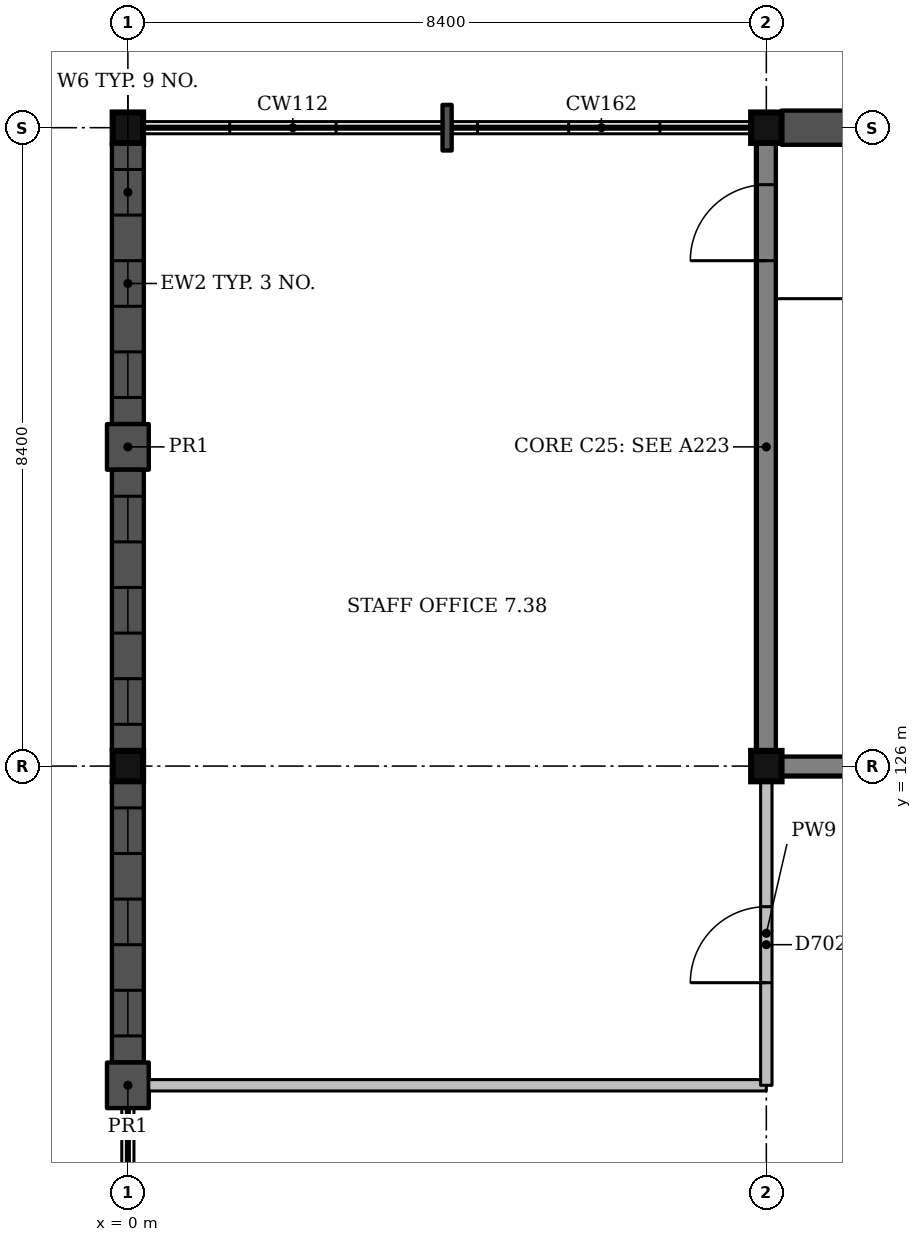
"""IFC4 building model, lengths in metres.
Left out: names, types, materials, properties, quantities, classifications, styles, units other than length and angle.
Written with IfcOpenShell. Run it as: python <this file> out.ifc"""

import sys

from ifc_helpers import new_model, si_unit, direction, frame, frame_2d, origin, origin_2d, place, context, subcontext, project, spatial, rectangle, extrude, element, fill, save


model = new_model("IFC4")
c1 = context("Model", 3, precision=1e-05, world=origin(), true_north=direction((0.0, 1.0)))
c2 = subcontext(c1, "Body", "Model", "MODEL_VIEW")
j1 = project(units=[si_unit("LENGTHUNIT", "METRE"), si_unit("PLANEANGLEUNIT", "RADIAN")], contexts=[c1])
p1 = place(None, origin())
s1 = spatial("IfcSite", under=j1, at=p1, CompositionType="ELEMENT")
p2 = place(p1, origin())
s2 = spatial("IfcBuilding", under=s1, at=p2, CompositionType="ELEMENT")
p3 = place(p2, frame((0.0, 0.0, 31.5)))
s3 = spatial("IfcBuildingStorey", under=s2, at=p3, CompositionType="ELEMENT", Elevation=31.5)
for number, where, z_axis, x_axis in (
    (1, (0.0, 126.0, 0.0), (0.0, 0.0, 1.0), (1.0, 0.0, 0.0)),
    (2, (0.0, 134.4, 0.0), (0.0, 0.0, 1.0), (1.0, 0.0, 0.0)),
    (3, (8.4, 126.0, 0.0), (0.0, 0.0, 1.0), (1.0, 0.0, 0.0)),
    (4, (8.4, 134.4, 0.0), (0.0, 0.0, 1.0), (1.0, 0.0, 0.0)),
):
    element("IfcColumn", number, at=place(p3, frame(where, z_axis=z_axis, x_axis=x_axis)), inside=s3, PredefinedType="COLUMN", context=c2, shape_type="SweptSolid", body=[
        extrude(rectangle(XDim=0.4, YDim=0.4, at=origin_2d()), origin(), (0.0, 0.0, 1.0), 4.5),
    ])
p4 = place(p3, frame((8.6, 126.0, 0.0), z_axis=(0.0, 0.0, 1.0), x_axis=(1.0, 0.0, 0.0)))
e5 = element("IfcWall", 5, at=p4, inside=s3, PredefinedType="SHEAR", context=c2, shape_type="SweptSolid", body=[
    extrude(rectangle(XDim=5.525, YDim=0.25, at=frame_2d((2.762, 0.0))), origin(), (0.0, 0.0, 1.0), 4.2),
])
p5 = place(p3, frame((8.4, 126.2, 0.0), z_axis=(0.0, 0.0, 1.0), x_axis=(0.0, 1.0, 0.0)))
e6 = element("IfcWall", 6, at=p5, inside=s3, PredefinedType="SHEAR", context=c2, shape_type="SweptSolid", body=[
    extrude(rectangle(XDim=8.0, YDim=0.25, at=frame_2d((4.0, 0.0))), origin(), (0.0, 0.0, 1.0), 4.2),
])
p6 = place(p5, frame((6.45, 0.0, 0.0)))
e7 = element("IfcOpeningElement", 7, at=p6, cuts=e6, PredefinedType="OPENING", context=c2, shape_type="SweptSolid", body=[
    extrude(rectangle(XDim=1.0, YDim=2.1, at=frame_2d((0.5, 1.05))), frame((0.0, 0.135, 0.0), z_axis=(0.0, -1.0, 0.0), x_axis=(1.0, 0.0, 0.0)), (0.0, 0.0, 1.0), 0.27),
])
p7 = place(p3, frame((11.207, 134.4, 0.0), z_axis=(0.0, 0.0, 1.0), x_axis=(-1.0, 0.0, 0.0)))
e8 = element("IfcWall", 8, at=p7, inside=s3, PredefinedType="SOLIDWALL", context=c2, shape_type="SweptSolid", body=[
    extrude(rectangle(XDim=2.607, YDim=0.45, at=frame_2d((1.303, 0.0))), origin(), (0.0, 0.0, 1.0), 3.6),
])
p8 = place(p3, frame((4.26, 134.4, 0.0), z_axis=(0.0, 0.0, 1.0), x_axis=(-1.0, 0.0, 0.0)))
e9 = element("IfcWall", 9, at=p8, inside=s3, PredefinedType="SOLIDWALL", context=c2, shape_type="SweptSolid", body=[
    extrude(rectangle(XDim=0.12, YDim=0.6, at=frame_2d((0.06, 0.0))), origin(), (0.0, 0.0, 1.0), 3.6),
])
p9 = place(p3, frame((0.0, 134.2, 0.0), z_axis=(0.0, 0.0, 1.0), x_axis=(0.0, -1.0, 0.0)))
e10 = element("IfcWall", 10, at=p9, inside=s3, PredefinedType="SOLIDWALL", context=c2, shape_type="SweptSolid", body=[
    extrude(rectangle(XDim=3.7, YDim=0.42, at=frame_2d((1.85, 0.0))), origin(), (0.0, 0.0, 1.0), 3.6),
])
p10 = place(p9, frame((0.35, 0.0, 1.0)))
e11 = element("IfcOpeningElement", 11, at=p10, cuts=e10, PredefinedType="OPENING", context=c2, shape_type="SweptSolid", body=[
    extrude(rectangle(XDim=0.6, YDim=2.1, at=frame_2d((0.3, 1.05))), frame((0.0, 0.22, 0.0), z_axis=(0.0, -1.0, 0.0), x_axis=(1.0, 0.0, 0.0)), (0.0, 0.0, 1.0), 0.44),
])
p11 = place(p9, frame((1.55, 0.0, 1.0)))
e12 = element("IfcOpeningElement", 12, at=p11, cuts=e10, PredefinedType="OPENING", context=c2, shape_type="SweptSolid", body=[
    extrude(rectangle(XDim=0.6, YDim=2.1, at=frame_2d((0.3, 1.05))), frame((0.0, 0.22, 0.0), z_axis=(0.0, -1.0, 0.0), x_axis=(1.0, 0.0, 0.0)), (0.0, 0.0, 1.0), 0.44),
])
p12 = place(p9, frame((2.75, 0.0, 1.0)))
e13 = element("IfcOpeningElement", 13, at=p12, cuts=e10, PredefinedType="OPENING", context=c2, shape_type="SweptSolid", body=[
    extrude(rectangle(XDim=0.6, YDim=2.1, at=frame_2d((0.3, 1.05))), frame((0.0, 0.22, 0.0), z_axis=(0.0, -1.0, 0.0), x_axis=(1.0, 0.0, 0.0)), (0.0, 0.0, 1.0), 0.44),
])
p13 = place(p3, frame((0.0, 130.5, 0.0), z_axis=(0.0, 0.0, 1.0), x_axis=(0.0, -1.0, 0.0)))
e14 = element("IfcWall", 14, at=p13, inside=s3, PredefinedType="SOLIDWALL", context=c2, shape_type="SweptSolid", body=[
    extrude(rectangle(XDim=0.6, YDim=0.55, at=frame_2d((0.3, 0.0))), origin(), (0.0, 0.0, 1.0), 3.6),
])
p14 = place(p3, frame((0.0, 129.9, 0.0), z_axis=(0.0, 0.0, 1.0), x_axis=(0.0, -1.0, 0.0)))
e15 = element("IfcWall", 15, at=p14, inside=s3, PredefinedType="SOLIDWALL", context=c2, shape_type="SweptSolid", body=[
    extrude(rectangle(XDim=3.7, YDim=0.42, at=frame_2d((1.85, 0.0))), origin(), (0.0, 0.0, 1.0), 3.6),
])
p15 = place(p14, frame((0.35, 0.0, 1.0)))
e16 = element("IfcOpeningElement", 16, at=p15, cuts=e15, PredefinedType="OPENING", context=c2, shape_type="SweptSolid", body=[
    extrude(rectangle(XDim=0.6, YDim=2.1, at=frame_2d((0.3, 1.05))), frame((0.0, 0.22, 0.0), z_axis=(0.0, -1.0, 0.0), x_axis=(1.0, 0.0, 0.0)), (0.0, 0.0, 1.0), 0.44),
])
p16 = place(p14, frame((1.55, 0.0, 1.0)))
e17 = element("IfcOpeningElement", 17, at=p16, cuts=e15, PredefinedType="OPENING", context=c2, shape_type="SweptSolid", body=[
    extrude(rectangle(XDim=0.6, YDim=2.1, at=frame_2d((0.3, 1.05))), frame((0.0, 0.22, 0.0), z_axis=(0.0, -1.0, 0.0), x_axis=(1.0, 0.0, 0.0)), (0.0, 0.0, 1.0), 0.44),
])
p17 = place(p14, frame((2.75, 0.0, 1.0)))
e18 = element("IfcOpeningElement", 18, at=p17, cuts=e15, PredefinedType="OPENING", context=c2, shape_type="SweptSolid", body=[
    extrude(rectangle(XDim=0.6, YDim=2.1, at=frame_2d((0.3, 1.05))), frame((0.0, 0.22, 0.0), z_axis=(0.0, -1.0, 0.0), x_axis=(1.0, 0.0, 0.0)), (0.0, 0.0, 1.0), 0.44),
])
p18 = place(p3, frame((0.0, 125.8, 0.0), z_axis=(0.0, 0.0, 1.0), x_axis=(0.0, -1.0, 0.0)))
e19 = element("IfcWall", 19, at=p18, inside=s3, PredefinedType="SOLIDWALL", context=c2, shape_type="SweptSolid", body=[
    extrude(rectangle(XDim=3.7, YDim=0.42, at=frame_2d((1.85, 0.0))), origin(), (0.0, 0.0, 1.0), 3.6),
])
p19 = place(p18, frame((0.35, 0.0, 1.0)))
e20 = element("IfcOpeningElement", 20, at=p19, cuts=e19, PredefinedType="OPENING", context=c2, shape_type="SweptSolid", body=[
    extrude(rectangle(XDim=0.6, YDim=2.1, at=frame_2d((0.3, 1.05))), frame((0.0, 0.22, 0.0), z_axis=(0.0, -1.0, 0.0), x_axis=(1.0, 0.0, 0.0)), (0.0, 0.0, 1.0), 0.44),
])
p20 = place(p18, frame((1.55, 0.0, 1.0)))
e21 = element("IfcOpeningElement", 21, at=p20, cuts=e19, PredefinedType="OPENING", context=c2, shape_type="SweptSolid", body=[
    extrude(rectangle(XDim=0.6, YDim=2.1, at=frame_2d((0.3, 1.05))), frame((0.0, 0.22, 0.0), z_axis=(0.0, -1.0, 0.0), x_axis=(1.0, 0.0, 0.0)), (0.0, 0.0, 1.0), 0.44),
])
p21 = place(p18, frame((2.75, 0.0, 1.0)))
e22 = element("IfcOpeningElement", 22, at=p21, cuts=e19, PredefinedType="OPENING", context=c2, shape_type="SweptSolid", body=[
    extrude(rectangle(XDim=0.6, YDim=2.1, at=frame_2d((0.3, 1.05))), frame((0.0, 0.22, 0.0), z_axis=(0.0, -1.0, 0.0), x_axis=(1.0, 0.0, 0.0)), (0.0, 0.0, 1.0), 0.44),
])
p22 = place(p3, frame((0.0, 122.1, 0.0), z_axis=(0.0, 0.0, 1.0), x_axis=(0.0, -1.0, 0.0)))
e23 = element("IfcWall", 23, at=p22, inside=s3, PredefinedType="SOLIDWALL", context=c2, shape_type="SweptSolid", body=[
    extrude(rectangle(XDim=0.6, YDim=0.55, at=frame_2d((0.3, 0.0))), origin(), (0.0, 0.0, 1.0), 3.6),
])
p23 = place(p3, frame((0.275, 121.8, 0.0), z_axis=(0.0, 0.0, 1.0), x_axis=(1.0, 0.0, 0.0)))
e24 = element("IfcWall", 24, at=p23, inside=s3, PredefinedType="PARTITIONING", context=c2, shape_type="SweptSolid", body=[
    extrude(rectangle(XDim=8.125, YDim=0.15, at=frame_2d((4.062, 0.0))), origin(), (0.0, 0.0, 1.0), 3.6),
])
p24 = place(p3, frame((8.4, 121.8, 0.0), z_axis=(0.0, 0.0, 1.0), x_axis=(0.0, 1.0, 0.0)))
e25 = element("IfcWall", 25, at=p24, inside=s3, PredefinedType="PARTITIONING", context=c2, shape_type="SweptSolid", body=[
    extrude(rectangle(XDim=4.0, YDim=0.15, at=frame_2d((2.0, 0.0))), origin(), (0.0, 0.0, 1.0), 3.6),
])
p25 = place(p24, frame((1.35, 0.0, 0.0)))
e26 = element("IfcOpeningElement", 26, at=p25, cuts=e25, PredefinedType="OPENING", context=c2, shape_type="SweptSolid", body=[
    extrude(rectangle(XDim=1.0, YDim=2.1, at=frame_2d((0.5, 1.05))), frame((0.0, 0.085, 0.0), z_axis=(0.0, -1.0, 0.0), x_axis=(1.0, 0.0, 0.0)), (0.0, 0.0, 1.0), 0.17),
])
p26 = place(p10, origin())
e27 = element("IfcWindow", 27, at=p26, inside=s3, PartitioningType="SINGLE_PANEL", PredefinedType="WINDOW", context=c2, shape_type="SweptSolid", body=[
    extrude(rectangle(XDim=0.6, YDim=2.1, at=frame_2d((0.3, 1.05))), frame((0.0, 0.15, 0.0), z_axis=(0.0, -1.0, 0.0), x_axis=(1.0, 0.0, 0.0)), (0.0, 0.0, 1.0), 0.06),
])
fill(e11, e27)
p27 = place(p11, origin())
e28 = element("IfcWindow", 28, at=p27, inside=s3, PartitioningType="SINGLE_PANEL", PredefinedType="WINDOW", context=c2, shape_type="SweptSolid", body=[
    extrude(rectangle(XDim=0.6, YDim=2.1, at=frame_2d((0.3, 1.05))), frame((0.0, 0.15, 0.0), z_axis=(0.0, -1.0, 0.0), x_axis=(1.0, 0.0, 0.0)), (0.0, 0.0, 1.0), 0.06),
])
fill(e12, e28)
p28 = place(p12, origin())
e29 = element("IfcWindow", 29, at=p28, inside=s3, PartitioningType="SINGLE_PANEL", PredefinedType="WINDOW", context=c2, shape_type="SweptSolid", body=[
    extrude(rectangle(XDim=0.6, YDim=2.1, at=frame_2d((0.3, 1.05))), frame((0.0, 0.15, 0.0), z_axis=(0.0, -1.0, 0.0), x_axis=(1.0, 0.0, 0.0)), (0.0, 0.0, 1.0), 0.06),
])
fill(e13, e29)
p29 = place(p15, origin())
e30 = element("IfcWindow", 30, at=p29, inside=s3, PartitioningType="SINGLE_PANEL", PredefinedType="WINDOW", context=c2, shape_type="SweptSolid", body=[
    extrude(rectangle(XDim=0.6, YDim=2.1, at=frame_2d((0.3, 1.05))), frame((0.0, 0.15, 0.0), z_axis=(0.0, -1.0, 0.0), x_axis=(1.0, 0.0, 0.0)), (0.0, 0.0, 1.0), 0.06),
])
fill(e16, e30)
p30 = place(p16, origin())
e31 = element("IfcWindow", 31, at=p30, inside=s3, PartitioningType="SINGLE_PANEL", PredefinedType="WINDOW", context=c2, shape_type="SweptSolid", body=[
    extrude(rectangle(XDim=0.6, YDim=2.1, at=frame_2d((0.3, 1.05))), frame((0.0, 0.15, 0.0), z_axis=(0.0, -1.0, 0.0), x_axis=(1.0, 0.0, 0.0)), (0.0, 0.0, 1.0), 0.06),
])
fill(e17, e31)
p31 = place(p17, origin())
e32 = element("IfcWindow", 32, at=p31, inside=s3, PartitioningType="SINGLE_PANEL", PredefinedType="WINDOW", context=c2, shape_type="SweptSolid", body=[
    extrude(rectangle(XDim=0.6, YDim=2.1, at=frame_2d((0.3, 1.05))), frame((0.0, 0.15, 0.0), z_axis=(0.0, -1.0, 0.0), x_axis=(1.0, 0.0, 0.0)), (0.0, 0.0, 1.0), 0.06),
])
fill(e18, e32)
p32 = place(p19, origin())
e33 = element("IfcWindow", 33, at=p32, inside=s3, PartitioningType="SINGLE_PANEL", PredefinedType="WINDOW", context=c2, shape_type="SweptSolid", body=[
    extrude(rectangle(XDim=0.6, YDim=2.1, at=frame_2d((0.3, 1.05))), frame((0.0, 0.15, 0.0), z_axis=(0.0, -1.0, 0.0), x_axis=(1.0, 0.0, 0.0)), (0.0, 0.0, 1.0), 0.06),
])
fill(e20, e33)
p33 = place(p20, origin())
e34 = element("IfcWindow", 34, at=p33, inside=s3, PartitioningType="SINGLE_PANEL", PredefinedType="WINDOW", context=c2, shape_type="SweptSolid", body=[
    extrude(rectangle(XDim=0.6, YDim=2.1, at=frame_2d((0.3, 1.05))), frame((0.0, 0.15, 0.0), z_axis=(0.0, -1.0, 0.0), x_axis=(1.0, 0.0, 0.0)), (0.0, 0.0, 1.0), 0.06),
])
fill(e21, e34)
p34 = place(p21, origin())
e35 = element("IfcWindow", 35, at=p34, inside=s3, PartitioningType="SINGLE_PANEL", PredefinedType="WINDOW", context=c2, shape_type="SweptSolid", body=[
    extrude(rectangle(XDim=0.6, YDim=2.1, at=frame_2d((0.3, 1.05))), frame((0.0, 0.15, 0.0), z_axis=(0.0, -1.0, 0.0), x_axis=(1.0, 0.0, 0.0)), (0.0, 0.0, 1.0), 0.06),
])
fill(e22, e35)
p35 = place(p25, origin())
e36 = element("IfcDoor", 36, at=p35, inside=s3, OperationType="SINGLE_SWING_LEFT", PredefinedType="DOOR", context=c2, shape_type="SweptSolid", body=[
    extrude(rectangle(XDim=1.0, YDim=2.1, at=frame_2d((0.5, 1.05))), frame((0.0, 0.025, 0.0), z_axis=(0.0, -1.0, 0.0), x_axis=(1.0, 0.0, 0.0)), (0.0, 0.0, 1.0), 0.05),
])
fill(e26, e36)
p36 = place(p6, origin())
e37 = element("IfcDoor", 37, at=p36, inside=s3, OperationType="SINGLE_SWING_LEFT", PredefinedType="DOOR", context=c2, shape_type="SweptSolid", body=[
    extrude(rectangle(XDim=1.0, YDim=2.1, at=frame_2d((0.5, 1.05))), frame((0.0, 0.025, 0.0), z_axis=(0.0, -1.0, 0.0), x_axis=(1.0, 0.0, 0.0)), (0.0, 0.0, 1.0), 0.05),
])
fill(e7, e37)
save(model, sys.argv[1])
